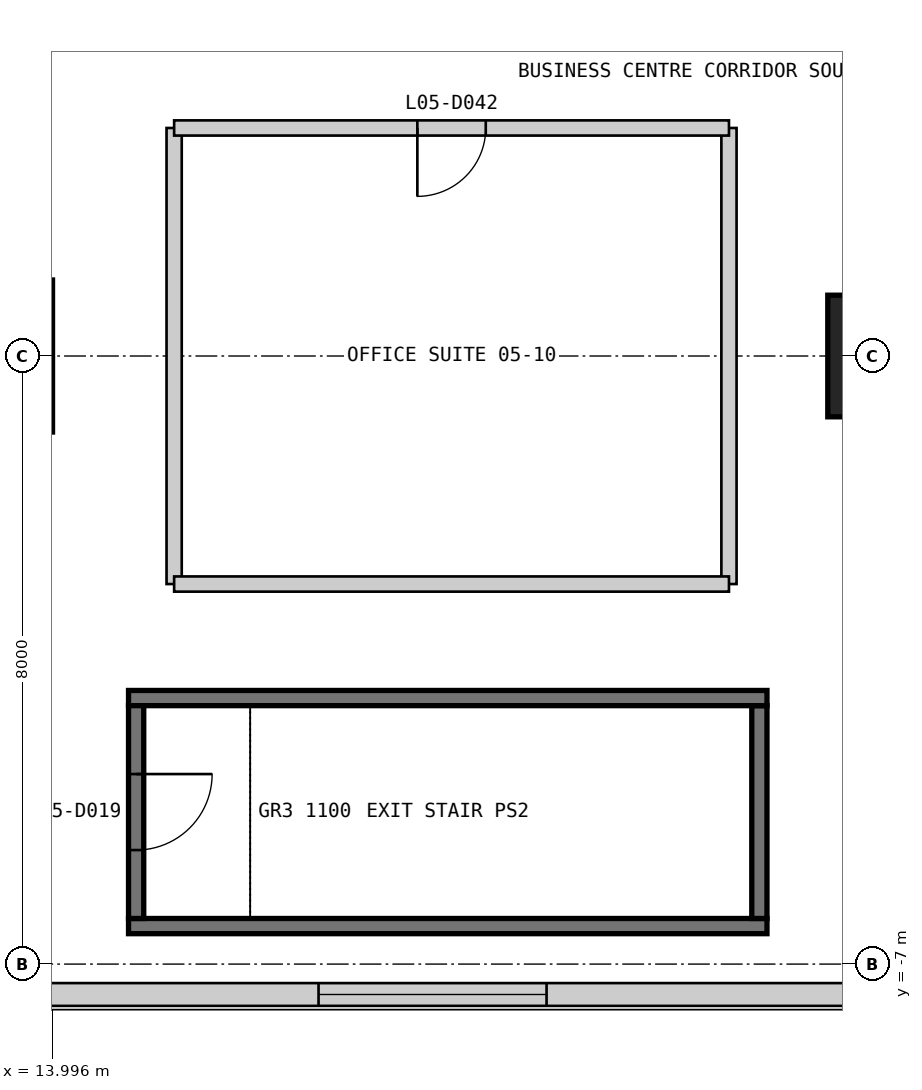
"""IFC4 building model, lengths in metres.
Left out: names, types, materials, properties, quantities, classifications, styles, units other than length and angle.
Written with IfcOpenShell. Run it as: python <this file> out.ifc"""

import sys

from ifc_helpers import new_model, si_unit, direction, frame, frame_2d, origin, origin_2d, place, context, subcontext, project, spatial, rectangle, extrude, element, fill, save


model = new_model("IFC4")
c1 = context("Model", 3, precision=1e-05, world=origin(), true_north=direction((0.0, 1.0)))
c2 = subcontext(c1, "Body", "Model", "MODEL_VIEW")
j1 = project(units=[si_unit("LENGTHUNIT", "METRE"), si_unit("PLANEANGLEUNIT", "RADIAN")], contexts=[c1])
p1 = place(None, origin())
s1 = spatial("IfcSite", under=j1, at=p1, CompositionType="ELEMENT")
p2 = place(p1, origin())
s2 = spatial("IfcBuilding", under=s1, at=p2, CompositionType="ELEMENT")
p3 = place(p2, frame((0.0, 0.0, 26.2)))
s3 = spatial("IfcBuildingStorey", under=s2, at=p3, CompositionType="ELEMENT", Elevation=26.2)
p4 = place(p3, frame((25.0, 1.0, 0.0), z_axis=(0.0, 0.0, 1.0), x_axis=(1.0, 0.0, 0.0)))
e1 = element("IfcColumn", 1, at=p4, inside=s3, PredefinedType="COLUMN", context=c2, shape_type="SweptSolid", body=[
    extrude(rectangle(XDim=1.6, YDim=1.6, at=origin_2d()), origin(), (0.0, 0.0, 1.0), 4.8),
])
p5 = place(p3, frame((-7.55, -7.4, 0.0), z_axis=(0.0, 0.0, 1.0), x_axis=(1.0, 0.0, 0.0)))
e2 = element("IfcWall", 2, at=p5, inside=s3, PredefinedType="SOLIDWALL", context=c2, shape_type="SweptSolid", body=[
    extrude(rectangle(XDim=65.1, YDim=0.3, at=frame_2d((32.55, 0.0))), origin(), (0.0, 0.0, 1.0), 4.5),
])
p6 = place(p5, frame((3.05, 0.0, 0.9)))
e3 = element("IfcOpeningElement", 3, at=p6, cuts=e2, PredefinedType="OPENING", context=c2, shape_type="SweptSolid", body=[
    extrude(rectangle(XDim=3.0, YDim=2.4, at=frame_2d((1.5, 1.2))), frame((0.0, 0.16, 0.0), z_axis=(0.0, -1.0, 0.0), x_axis=(1.0, 0.0, 0.0)), (0.0, 0.0, 1.0), 0.32),
])
p7 = place(p5, frame((11.05, 0.0, 0.9)))
e4 = element("IfcOpeningElement", 4, at=p7, cuts=e2, PredefinedType="OPENING", context=c2, shape_type="SweptSolid", body=[
    extrude(rectangle(XDim=3.0, YDim=2.4, at=frame_2d((1.5, 1.2))), frame((0.0, 0.16, 0.0), z_axis=(0.0, -1.0, 0.0), x_axis=(1.0, 0.0, 0.0)), (0.0, 0.0, 1.0), 0.32),
])
p8 = place(p5, frame((25.05, 0.0, 0.9)))
e5 = element("IfcOpeningElement", 5, at=p8, cuts=e2, PredefinedType="OPENING", context=c2, shape_type="SweptSolid", body=[
    extrude(rectangle(XDim=3.0, YDim=2.4, at=frame_2d((1.5, 1.2))), frame((0.0, 0.16, 0.0), z_axis=(0.0, -1.0, 0.0), x_axis=(1.0, 0.0, 0.0)), (0.0, 0.0, 1.0), 0.32),
])
p9 = place(p5, frame((37.05, 0.0, 0.9)))
e6 = element("IfcOpeningElement", 6, at=p9, cuts=e2, PredefinedType="OPENING", context=c2, shape_type="SweptSolid", body=[
    extrude(rectangle(XDim=3.0, YDim=2.4, at=frame_2d((1.5, 1.2))), frame((0.0, 0.16, 0.0), z_axis=(0.0, -1.0, 0.0), x_axis=(1.0, 0.0, 0.0)), (0.0, 0.0, 1.0), 0.32),
])
p10 = place(p5, frame((45.55, 0.0, 0.9)))
e7 = element("IfcOpeningElement", 7, at=p10, cuts=e2, PredefinedType="OPENING", context=c2, shape_type="SweptSolid", body=[
    extrude(rectangle(XDim=3.0, YDim=2.4, at=frame_2d((1.5, 1.2))), frame((0.0, 0.16, 0.0), z_axis=(0.0, -1.0, 0.0), x_axis=(1.0, 0.0, 0.0)), (0.0, 0.0, 1.0), 0.32),
])
p11 = place(p5, frame((51.55, 0.0, 0.9)))
e8 = element("IfcOpeningElement", 8, at=p11, cuts=e2, PredefinedType="OPENING", context=c2, shape_type="SweptSolid", body=[
    extrude(rectangle(XDim=3.0, YDim=2.4, at=frame_2d((1.5, 1.2))), frame((0.0, 0.16, 0.0), z_axis=(0.0, -1.0, 0.0), x_axis=(1.0, 0.0, 0.0)), (0.0, 0.0, 1.0), 0.32),
])
p12 = place(p5, frame((59.05, 0.0, 0.9)))
e9 = element("IfcOpeningElement", 9, at=p12, cuts=e2, PredefinedType="OPENING", context=c2, shape_type="SweptSolid", body=[
    extrude(rectangle(XDim=3.0, YDim=2.4, at=frame_2d((1.5, 1.2))), frame((0.0, 0.16, 0.0), z_axis=(0.0, -1.0, 0.0), x_axis=(1.0, 0.0, 0.0)), (0.0, 0.0, 1.0), 0.32),
])
p13 = place(p3, frame((15.0, -6.5, 0.0), z_axis=(0.0, 0.0, 1.0), x_axis=(1.0, 0.0, 0.0)))
e10 = element("IfcWall", 10, at=p13, inside=s3, PredefinedType="SOLIDWALL", context=c2, shape_type="SweptSolid", body=[
    extrude(rectangle(XDim=8.4, YDim=0.2, at=frame_2d((4.2, 0.0))), origin(), (0.0, 0.0, 1.0), 4.8),
])
p14 = place(p3, frame((23.3, -6.4, 0.0), z_axis=(0.0, 0.0, 1.0), x_axis=(0.0, 1.0, 0.0)))
e11 = element("IfcWall", 11, at=p14, inside=s3, PredefinedType="SOLIDWALL", context=c2, shape_type="SweptSolid", body=[
    extrude(rectangle(XDim=2.8, YDim=0.2, at=frame_2d((1.4, 0.0))), origin(), (0.0, 0.0, 1.0), 4.8),
])
p15 = place(p3, frame((23.4, -3.5, 0.0), z_axis=(0.0, 0.0, 1.0), x_axis=(-1.0, 0.0, 0.0)))
e12 = element("IfcWall", 12, at=p15, inside=s3, PredefinedType="SOLIDWALL", context=c2, shape_type="SweptSolid", body=[
    extrude(rectangle(XDim=8.4, YDim=0.2, at=frame_2d((4.2, 0.0))), origin(), (0.0, 0.0, 1.0), 4.8),
])
p16 = place(p3, frame((15.1, -3.6, 0.0), z_axis=(0.0, 0.0, 1.0), x_axis=(0.0, -1.0, 0.0)))
e13 = element("IfcWall", 13, at=p16, inside=s3, PredefinedType="SOLIDWALL", context=c2, shape_type="SweptSolid", body=[
    extrude(rectangle(XDim=2.8, YDim=0.2, at=frame_2d((1.4, 0.0))), origin(), (0.0, 0.0, 1.0), 4.8),
])
p17 = place(p16, frame((0.9, 0.0, 0.0)))
e14 = element("IfcOpeningElement", 14, at=p17, cuts=e13, PredefinedType="OPENING", context=c2, shape_type="SweptSolid", body=[
    extrude(rectangle(XDim=1.0, YDim=2.2, at=frame_2d((0.5, 1.1))), frame((0.0, 0.11, 0.0), z_axis=(0.0, -1.0, 0.0), x_axis=(1.0, 0.0, 0.0)), (0.0, 0.0, 1.0), 0.22),
])
for number, where, z_axis, x_axis in (
    (15, (15.6, -2.0, 0.0), (0.0, 0.0, 1.0), (0.0, 1.0, 0.0)),
    (16, (22.9, -2.0, 0.0), (0.0, 0.0, 1.0), (0.0, 1.0, 0.0)),
):
    element("IfcWall", number, at=place(p3, frame(where, z_axis=z_axis, x_axis=x_axis)), inside=s3, PredefinedType="PARTITIONING", context=c2, shape_type="SweptSolid", body=[
        extrude(rectangle(XDim=6.0, YDim=0.2, at=frame_2d((3.0, 0.0))), origin(), (0.0, 0.0, 1.0), 4.5),
    ])
p18 = place(p3, frame((15.6, -2.0, 0.0), z_axis=(0.0, 0.0, 1.0), x_axis=(1.0, 0.0, 0.0)))
e17 = element("IfcWall", 17, at=p18, inside=s3, PredefinedType="PARTITIONING", context=c2, shape_type="SweptSolid", body=[
    extrude(rectangle(XDim=7.3, YDim=0.2, at=frame_2d((3.65, 0.0))), origin(), (0.0, 0.0, 1.0), 4.5),
])
p19 = place(p3, frame((15.6, 4.0, 0.0), z_axis=(0.0, 0.0, 1.0), x_axis=(1.0, 0.0, 0.0)))
e18 = element("IfcWall", 18, at=p19, inside=s3, PredefinedType="PARTITIONING", context=c2, shape_type="SweptSolid", body=[
    extrude(rectangle(XDim=7.3, YDim=0.2, at=frame_2d((3.65, 0.0))), origin(), (0.0, 0.0, 1.0), 4.5),
])
p20 = place(p19, frame((3.2, 0.0, 0.0)))
e19 = element("IfcOpeningElement", 19, at=p20, cuts=e18, PredefinedType="OPENING", context=c2, shape_type="SweptSolid", body=[
    extrude(rectangle(XDim=0.9, YDim=2.2, at=frame_2d((0.45, 1.1))), frame((0.0, 0.11, 0.0), z_axis=(0.0, -1.0, 0.0), x_axis=(1.0, 0.0, 0.0)), (0.0, 0.0, 1.0), 0.22),
])
p21 = place(p8, origin())
e20 = element("IfcWindow", 20, at=p21, inside=s3, PartitioningType="SINGLE_PANEL", PredefinedType="WINDOW", context=c2, shape_type="SweptSolid", body=[
    extrude(rectangle(XDim=3.0, YDim=2.4, at=frame_2d((1.5, 1.2))), frame((0.0, 0.03, 0.0), z_axis=(0.0, -1.0, 0.0), x_axis=(1.0, 0.0, 0.0)), (0.0, 0.0, 1.0), 0.06),
])
fill(e5, e20)
p22 = place(p17, origin())
e21 = element("IfcDoor", 21, at=p22, inside=s3, OperationType="SINGLE_SWING_LEFT", PredefinedType="DOOR", context=c2, shape_type="SweptSolid", body=[
    extrude(rectangle(XDim=1.0, YDim=2.2, at=frame_2d((0.5, 1.1))), frame((0.0, 0.025, 0.0), z_axis=(0.0, -1.0, 0.0), x_axis=(1.0, 0.0, 0.0)), (0.0, 0.0, 1.0), 0.05),
])
fill(e14, e21)
p23 = place(p20, frame((0.9, 0.0, 0.0), z_axis=(0.0, 0.0, 1.0), x_axis=(-1.0, 0.0, 0.0)))
e22 = element("IfcDoor", 22, at=p23, inside=s3, OperationType="SINGLE_SWING_RIGHT", PredefinedType="DOOR", context=c2, shape_type="SweptSolid", body=[
    extrude(rectangle(XDim=0.9, YDim=2.2, at=frame_2d((0.45, 1.1))), frame((0.0, 0.025, 0.0), z_axis=(0.0, -1.0, 0.0), x_axis=(1.0, 0.0, 0.0)), (0.0, 0.0, 1.0), 0.05),
])
fill(e19, e22)
save(model, sys.argv[1])
